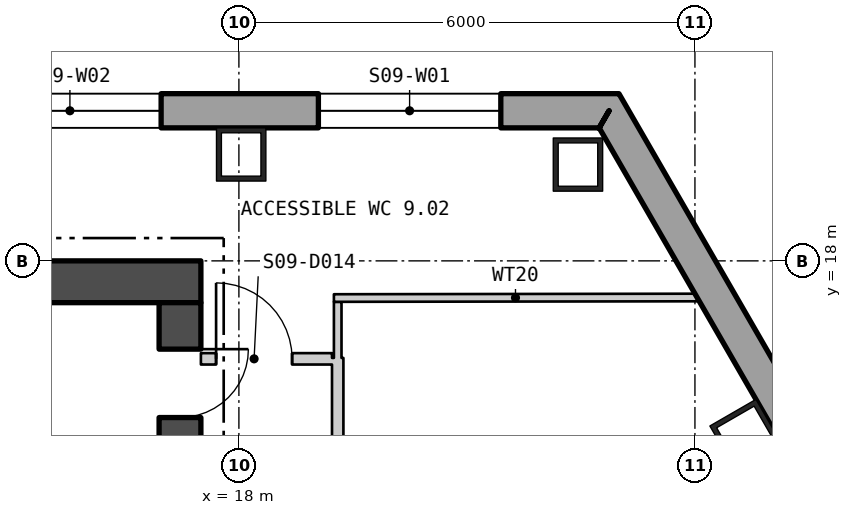
"""IFC4 building model, lengths in metres.
Left out: names, types, materials, properties, quantities, classifications, styles, units other than length and angle.
Written with IfcOpenShell. Run it as: python <this file> out.ifc"""

import sys

from ifc_helpers import new_model, si_unit, direction, frame, frame_2d, origin, origin_2d, place, context, subcontext, project, spatial, polyline, rectangle, hollow_rectangle, outline, extrude, element, fill, save


model = new_model("IFC4")
c1 = context("Model", 3, precision=1e-05, world=origin(), true_north=direction((0.0, 1.0)))
c2 = subcontext(c1, "Body", "Model", "MODEL_VIEW")
j1 = project(units=[si_unit("LENGTHUNIT", "METRE"), si_unit("PLANEANGLEUNIT", "RADIAN")], contexts=[c1])
p1 = place(None, origin())
s1 = spatial("IfcSite", under=j1, at=p1, CompositionType="ELEMENT")
p2 = place(p1, origin())
s2 = spatial("IfcBuilding", under=s1, at=p2, CompositionType="ELEMENT")
p3 = place(p2, frame((0.0, 0.0, 124.8)))
s3 = spatial("IfcBuildingStorey", under=s2, at=p3, CompositionType="ELEMENT", Elevation=124.8)
for number, where, z_axis, x_axis in (
    (1, (22.461, 19.267, 0.0), (0.0, 0.0, 1.0), (-1.0, 0.0, 0.0)),
    (2, (18.03, 19.4, 0.0), (0.0, 0.0, 1.0), (-1.0, 0.0, 0.0)),
    (3, (24.662, 15.721, 0.0), (0.0, 0.0, 1.0), (-0.5, 0.866, 0.0)),
):
    element("IfcColumn", number, at=place(p3, frame(where, z_axis=z_axis, x_axis=x_axis)), inside=s3, PredefinedType="COLUMN", context=c2, shape_type="SweptSolid", body=[
        extrude(hollow_rectangle(XDim=0.65, YDim=0.7, WallThickness=0.065, at=origin_2d()), origin(), (0.0, 0.0, 1.0), 4.5),
    ])
p4 = place(p3, frame((22.87, 19.975, -0.4), z_axis=(0.0, 0.0, 1.0), x_axis=(-1.0, 0.0, 0.0)))
e4 = element("IfcWall", 4, at=p4, inside=s3, PredefinedType="SOLIDWALL", context=c2, shape_type="SweptSolid", body=[
    extrude(outline(polyline([(-0.13, -0.225), (45.87, -0.225), (45.61, 0.225), (0.13, 0.225), (-0.13, -0.225)])), origin(), (0.0, 0.0, 1.0), 4.5),
])
p5 = place(p4, frame((1.424, 0.0, 1.3)))
e5 = element("IfcOpeningElement", 5, at=p5, cuts=e4, PredefinedType="OPENING", context=c2, shape_type="SweptSolid", body=[
    extrude(rectangle(XDim=2.4, YDim=2.6, at=frame_2d((1.2, 1.3))), frame((0.0, 0.235, 0.0), z_axis=(0.0, -1.0, 0.0), x_axis=(1.0, 0.0, 0.0)), (0.0, 0.0, 1.0), 0.47),
])
p6 = place(p4, frame((5.893, 0.0, 1.3)))
e6 = element("IfcOpeningElement", 6, at=p6, cuts=e4, PredefinedType="OPENING", context=c2, shape_type="SweptSolid", body=[
    extrude(rectangle(XDim=2.4, YDim=2.6, at=frame_2d((1.2, 1.3))), frame((0.0, 0.235, 0.0), z_axis=(0.0, -1.0, 0.0), x_axis=(1.0, 0.0, 0.0)), (0.0, 0.0, 1.0), 0.47),
])
p7 = place(p4, frame((10.401, 0.0, 1.3)))
e7 = element("IfcOpeningElement", 7, at=p7, cuts=e4, PredefinedType="OPENING", context=c2, shape_type="SweptSolid", body=[
    extrude(rectangle(XDim=2.4, YDim=2.6, at=frame_2d((1.2, 1.3))), frame((0.0, 0.235, 0.0), z_axis=(0.0, -1.0, 0.0), x_axis=(1.0, 0.0, 0.0)), (0.0, 0.0, 1.0), 0.47),
])
p8 = place(p4, frame((14.909, 0.0, 1.3)))
e8 = element("IfcOpeningElement", 8, at=p8, cuts=e4, PredefinedType="OPENING", context=c2, shape_type="SweptSolid", body=[
    extrude(rectangle(XDim=2.4, YDim=2.6, at=frame_2d((1.2, 1.3))), frame((0.0, 0.235, 0.0), z_axis=(0.0, -1.0, 0.0), x_axis=(1.0, 0.0, 0.0)), (0.0, 0.0, 1.0), 0.47),
])
p9 = place(p4, frame((19.416, 0.0, 1.3)))
e9 = element("IfcOpeningElement", 9, at=p9, cuts=e4, PredefinedType="OPENING", context=c2, shape_type="SweptSolid", body=[
    extrude(rectangle(XDim=2.4, YDim=2.6, at=frame_2d((1.2, 1.3))), frame((0.0, 0.235, 0.0), z_axis=(0.0, -1.0, 0.0), x_axis=(1.0, 0.0, 0.0)), (0.0, 0.0, 1.0), 0.47),
])
p10 = place(p4, frame((23.924, 0.0, 1.3)))
e10 = element("IfcOpeningElement", 10, at=p10, cuts=e4, PredefinedType="OPENING", context=c2, shape_type="SweptSolid", body=[
    extrude(rectangle(XDim=2.4, YDim=2.6, at=frame_2d((1.2, 1.3))), frame((0.0, 0.235, 0.0), z_axis=(0.0, -1.0, 0.0), x_axis=(1.0, 0.0, 0.0)), (0.0, 0.0, 1.0), 0.47),
])
p11 = place(p4, frame((28.431, 0.0, 1.3)))
e11 = element("IfcOpeningElement", 11, at=p11, cuts=e4, PredefinedType="OPENING", context=c2, shape_type="SweptSolid", body=[
    extrude(rectangle(XDim=2.4, YDim=2.6, at=frame_2d((1.2, 1.3))), frame((0.0, 0.235, 0.0), z_axis=(0.0, -1.0, 0.0), x_axis=(1.0, 0.0, 0.0)), (0.0, 0.0, 1.0), 0.47),
])
p12 = place(p4, frame((32.939, 0.0, 1.3)))
e12 = element("IfcOpeningElement", 12, at=p12, cuts=e4, PredefinedType="OPENING", context=c2, shape_type="SweptSolid", body=[
    extrude(rectangle(XDim=2.4, YDim=2.6, at=frame_2d((1.2, 1.3))), frame((0.0, 0.235, 0.0), z_axis=(0.0, -1.0, 0.0), x_axis=(1.0, 0.0, 0.0)), (0.0, 0.0, 1.0), 0.47),
])
p13 = place(p4, frame((37.447, 0.0, 1.3)))
e13 = element("IfcOpeningElement", 13, at=p13, cuts=e4, PredefinedType="OPENING", context=c2, shape_type="SweptSolid", body=[
    extrude(rectangle(XDim=2.4, YDim=2.6, at=frame_2d((1.2, 1.3))), frame((0.0, 0.235, 0.0), z_axis=(0.0, -1.0, 0.0), x_axis=(1.0, 0.0, 0.0)), (0.0, 0.0, 1.0), 0.47),
])
p14 = place(p3, frame((27.45, 12.042, -0.4), z_axis=(0.0, 0.0, 1.0), x_axis=(-0.499998388237, 0.866026334334, 0.0)))
e14 = element("IfcWall", 14, at=p14, inside=s3, PredefinedType="SOLIDWALL", context=c2, shape_type="SweptSolid", body=[
    extrude(outline(polyline([(-0.13, -0.225), (9.29, -0.225), (9.03, 0.225), (0.13, 0.225), (-0.13, -0.225)])), origin(), (0.0, 0.0, 1.0), 4.5),
])
p15 = place(p14, frame((1.594, 0.0, 1.3)))
e15 = element("IfcOpeningElement", 15, at=p15, cuts=e14, PredefinedType="OPENING", context=c2, shape_type="SweptSolid", body=[
    extrude(rectangle(XDim=1.8, YDim=2.6, at=frame_2d((0.9, 1.3))), frame((0.0, 0.235, 0.0), z_axis=(0.0, -1.0, 0.0), x_axis=(1.0, 0.0, 0.0)), (0.0, 0.0, 1.0), 0.47),
])
p16 = place(p3, frame((-17.5, 17.725, 0.0), z_axis=(0.0, 0.0, 1.0), x_axis=(1.0, 0.0, 0.0)))
e16 = element("IfcWall", 16, at=p16, inside=s3, PredefinedType="SHEAR", context=c2, shape_type="SweptSolid", body=[
    extrude(rectangle(XDim=35.0, YDim=0.55, at=frame_2d((17.5, 0.0))), origin(), (0.0, 0.0, 1.0), 4.3),
])
p17 = place(p3, frame((17.225, 0.55, 0.0), z_axis=(0.0, 0.0, 1.0), x_axis=(0.0, 1.0, 0.0)))
e17 = element("IfcWall", 17, at=p17, inside=s3, PredefinedType="SHEAR", context=c2, shape_type="SweptSolid", body=[
    extrude(rectangle(XDim=16.9, YDim=0.55, at=frame_2d((8.45, 0.0))), origin(), (0.0, 0.0, 1.0), 4.3),
])
p18 = place(p17, frame((5.75, 0.0, 0.0)))
e18 = element("IfcOpeningElement", 18, at=p18, cuts=e17, PredefinedType="OPENING", context=c2, shape_type="SweptSolid", body=[
    extrude(rectangle(XDim=1.5, YDim=2.1, at=frame_2d((0.75, 1.05))), frame((0.0, 0.285, 0.0), z_axis=(0.0, -1.0, 0.0), x_axis=(1.0, 0.0, 0.0)), (0.0, 0.0, 1.0), 0.57),
])
p19 = place(p17, frame((0.4, 0.0, 0.0)))
e19 = element("IfcOpeningElement", 19, at=p19, cuts=e17, PredefinedType="OPENING", context=c2, shape_type="SweptSolid", body=[
    extrude(rectangle(XDim=0.9, YDim=2.1, at=frame_2d((0.45, 1.05))), frame((0.0, 0.285, 0.0), z_axis=(0.0, -1.0, 0.0), x_axis=(1.0, 0.0, 0.0)), (0.0, 0.0, 1.0), 0.57),
])
p20 = place(p17, frame((3.175, 0.0, 0.0)))
e20 = element("IfcOpeningElement", 20, at=p20, cuts=e17, PredefinedType="OPENING", context=c2, shape_type="SweptSolid", body=[
    extrude(rectangle(XDim=0.9, YDim=2.1, at=frame_2d((0.45, 1.05))), frame((0.0, 0.285, 0.0), z_axis=(0.0, -1.0, 0.0), x_axis=(1.0, 0.0, 0.0)), (0.0, 0.0, 1.0), 0.57),
])
p21 = place(p17, frame((8.139, 0.0, 0.0)))
e21 = element("IfcOpeningElement", 21, at=p21, cuts=e17, PredefinedType="OPENING", context=c2, shape_type="SweptSolid", body=[
    extrude(rectangle(XDim=1.0, YDim=2.1, at=frame_2d((0.5, 1.05))), frame((0.0, 0.285, 0.0), z_axis=(0.0, -1.0, 0.0), x_axis=(1.0, 0.0, 0.0)), (0.0, 0.0, 1.0), 0.57),
])
p22 = place(p17, frame((11.877, 0.0, 0.0)))
e22 = element("IfcOpeningElement", 22, at=p22, cuts=e17, PredefinedType="OPENING", context=c2, shape_type="SweptSolid", body=[
    extrude(rectangle(XDim=0.9, YDim=2.1, at=frame_2d((0.45, 1.05))), frame((0.0, 0.285, 0.0), z_axis=(0.0, -1.0, 0.0), x_axis=(1.0, 0.0, 0.0)), (0.0, 0.0, 1.0), 0.57),
])
p23 = place(p17, frame((15.389, 0.0, 0.0)))
e23 = element("IfcOpeningElement", 23, at=p23, cuts=e17, PredefinedType="OPENING", context=c2, shape_type="SweptSolid", body=[
    extrude(rectangle(XDim=0.9, YDim=2.1, at=frame_2d((0.45, 1.05))), frame((0.0, 0.285, 0.0), z_axis=(0.0, -1.0, 0.0), x_axis=(1.0, 0.0, 0.0)), (0.0, 0.0, 1.0), 0.57),
])
p24 = place(p3, frame((17.5, 16.711, 0.0), z_axis=(0.0, 0.0, 1.0), x_axis=(1.0, 0.0, 0.0)))
e24 = element("IfcWall", 24, at=p24, inside=s3, PredefinedType="PARTITIONING", context=c2, shape_type="SweptSolid", body=[
    extrude(rectangle(XDim=1.725, YDim=0.15, at=frame_2d((0.863, 0.0))), origin(), (0.0, 0.0, 1.0), 4.3),
])
p25 = place(p24, frame((0.2, 0.0, 0.0)))
e25 = element("IfcOpeningElement", 25, at=p25, cuts=e24, PredefinedType="OPENING", context=c2, shape_type="SweptSolid", body=[
    extrude(rectangle(XDim=1.0, YDim=2.1, at=frame_2d((0.5, 1.05))), frame((0.0, 0.085, 0.0), z_axis=(0.0, -1.0, 0.0), x_axis=(1.0, 0.0, 0.0)), (0.0, 0.0, 1.0), 0.17),
])
p26 = place(p3, frame((19.25, 17.511, 0.0), z_axis=(0.0, 0.0, 1.0), x_axis=(0.999998926819, 0.001465046565, 0.0)))
e26 = element("IfcWall", 26, at=p26, inside=s3, PredefinedType="PARTITIONING", context=c2, shape_type="SweptSolid", body=[
    extrude(rectangle(XDim=4.778, YDim=0.1, at=frame_2d((2.389, 0.0))), origin(), (0.0, 0.0, 1.0), 4.3),
])
p27 = place(p3, frame((19.3, 13.052, 0.0), z_axis=(0.0, 0.0, 1.0), x_axis=(0.0, 1.0, 0.0)))
e27 = element("IfcWall", 27, at=p27, inside=s3, PredefinedType="PARTITIONING", context=c2, shape_type="SweptSolid", body=[
    extrude(rectangle(XDim=3.671, YDim=0.15, at=frame_2d((1.835, 0.0))), origin(), (0.0, 0.0, 1.0), 4.3),
])
p28 = place(p27, frame((1.36, 0.0, 0.0)))
e28 = element("IfcOpeningElement", 28, at=p28, cuts=e27, PredefinedType="OPENING", context=c2, shape_type="SweptSolid", body=[
    extrude(rectangle(XDim=1.0, YDim=2.1, at=frame_2d((0.5, 1.05))), frame((0.0, 0.085, 0.0), z_axis=(0.0, -1.0, 0.0), x_axis=(1.0, 0.0, 0.0)), (0.0, 0.0, 1.0), 0.17),
])
p29 = place(p3, frame((19.3, 16.723, 0.0), z_axis=(0.0, 0.0, 1.0), x_axis=(0.0, 1.0, 0.0)))
e29 = element("IfcWall", 29, at=p29, inside=s3, PredefinedType="PARTITIONING", context=c2, shape_type="SweptSolid", body=[
    extrude(rectangle(XDim=0.738, YDim=0.1, at=frame_2d((0.369, 0.0))), origin(), (0.0, 0.0, 1.0), 4.3),
])
p30 = place(p5, origin())
e30 = element("IfcWindow", 30, at=p30, inside=s3, PartitioningType="SINGLE_PANEL", PredefinedType="WINDOW", context=c2, shape_type="SweptSolid", body=[
    extrude(rectangle(XDim=2.4, YDim=2.6, at=frame_2d((1.2, 1.3))), frame((0.0, 0.105, 0.0), z_axis=(0.0, -1.0, 0.0), x_axis=(1.0, 0.0, 0.0)), (0.0, 0.0, 1.0), 0.06),
])
fill(e5, e30)
p31 = place(p6, origin())
e31 = element("IfcWindow", 31, at=p31, inside=s3, PartitioningType="SINGLE_PANEL", PredefinedType="WINDOW", context=c2, shape_type="SweptSolid", body=[
    extrude(rectangle(XDim=2.4, YDim=2.6, at=frame_2d((1.2, 1.3))), frame((0.0, 0.105, 0.0), z_axis=(0.0, -1.0, 0.0), x_axis=(1.0, 0.0, 0.0)), (0.0, 0.0, 1.0), 0.06),
])
fill(e6, e31)
p32 = place(p23, origin())
e32 = element("IfcDoor", 32, at=p32, inside=s3, OperationType="SINGLE_SWING_RIGHT", PredefinedType="DOOR", context=c2, shape_type="SweptSolid", body=[
    extrude(rectangle(XDim=0.9, YDim=2.1, at=frame_2d((0.45, 1.05))), frame((0.0, 0.025, 0.0), z_axis=(0.0, -1.0, 0.0), x_axis=(1.0, 0.0, 0.0)), (0.0, 0.0, 1.0), 0.05),
])
fill(e23, e32)
p33 = place(p25, origin())
e33 = element("IfcDoor", 33, at=p33, inside=s3, OperationType="SINGLE_SWING_RIGHT", PredefinedType="DOOR", context=c2, shape_type="SweptSolid", body=[
    extrude(rectangle(XDim=1.0, YDim=2.1, at=frame_2d((0.5, 1.05))), frame((0.0, 0.025, 0.0), z_axis=(0.0, -1.0, 0.0), x_axis=(1.0, 0.0, 0.0)), (0.0, 0.0, 1.0), 0.05),
])
fill(e25, e33)
save(model, sys.argv[1])
